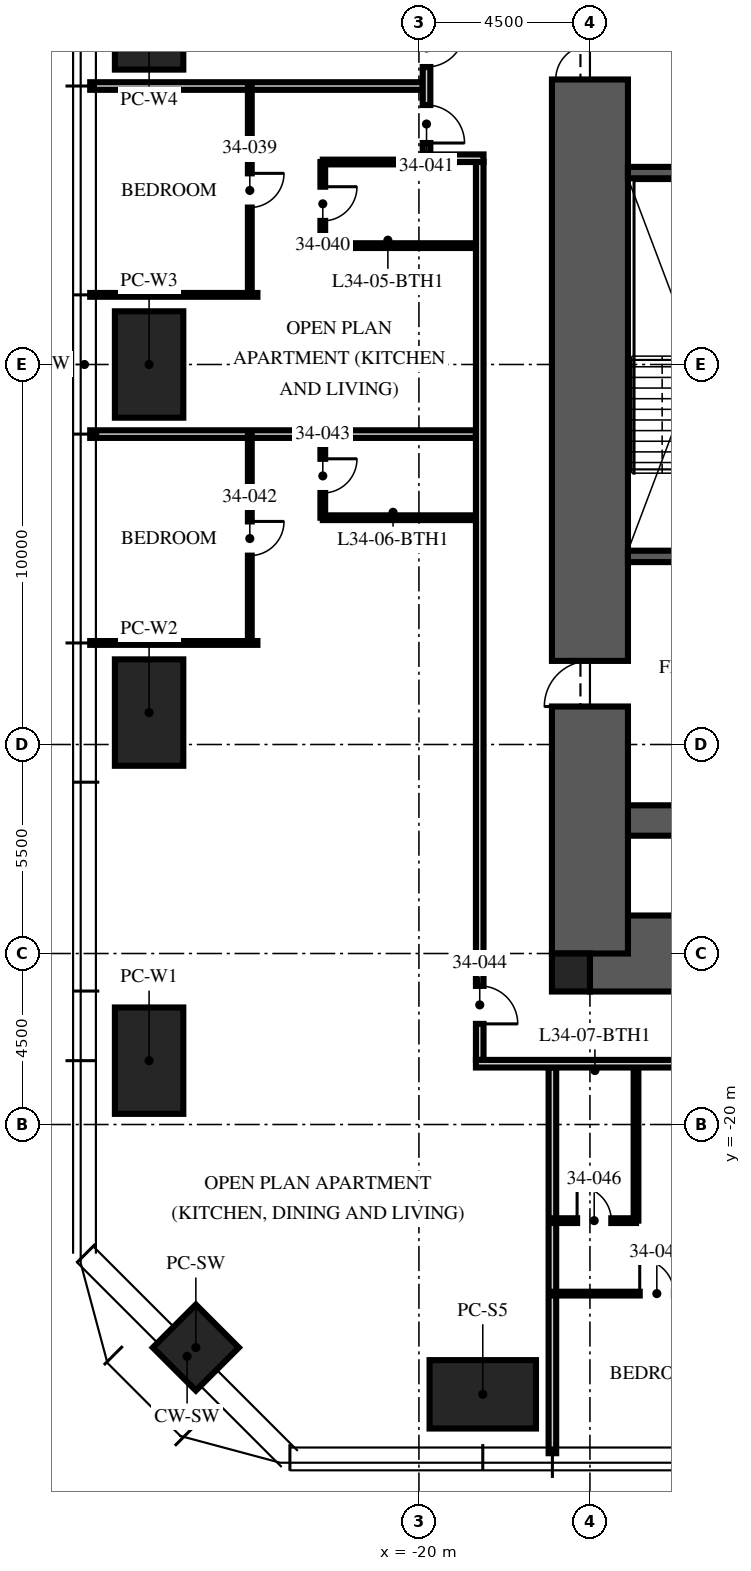
"""IFC4 building model, lengths in metres.
Left out: names, types, materials, properties, quantities, classifications, styles, units other than length and angle.
Written with IfcOpenShell. Run it as: python <this file> out.ifc"""

import sys

from ifc_helpers import new_model, si_unit, direction, frame, frame_2d, origin, origin_2d, place, context, subcontext, project, spatial, rectangle, extrude, element, fill, save


model = new_model("IFC4")
c1 = context("Model", 3, precision=1e-05, world=origin(), true_north=direction((0.0, 1.0)))
c2 = subcontext(c1, "Body", "Model", "MODEL_VIEW")
j1 = project(units=[si_unit("LENGTHUNIT", "METRE"), si_unit("PLANEANGLEUNIT", "RADIAN")], contexts=[c1])
p1 = place(None, origin())
s1 = spatial("IfcSite", under=j1, at=p1, CompositionType="ELEMENT")
p2 = place(p1, origin())
s2 = spatial("IfcBuilding", under=s1, at=p2, CompositionType="ELEMENT")
p3 = place(p2, frame((0.0, 0.0, 137.25)))
s3 = spatial("IfcBuildingStorey", under=s2, at=p3, CompositionType="ELEMENT", Elevation=137.25)
p4 = place(p3, frame((-15.5, -15.5, -0.25), z_axis=(0.0, 0.0, 1.0), x_axis=(1.0, 0.0, 0.0)))
e1 = element("IfcWall", 1, at=p4, inside=s3, PredefinedType="SHEAR", context=c2, shape_type="SweptSolid", body=[
    extrude(rectangle(XDim=31.0, YDim=2.0, at=frame_2d((15.5, 0.0))), origin(), (0.0, 0.0, 1.0), 3.75),
])
p5 = place(p4, frame((10.4, 0.0, 0.25)))
e2 = element("IfcOpeningElement", 2, at=p5, cuts=e1, PredefinedType="OPENING", context=c2, shape_type="SweptSolid", body=[
    extrude(rectangle(XDim=1.1, YDim=2.1, at=frame_2d((0.55, 1.05))), frame((0.0, 1.01, 0.0), z_axis=(0.0, -1.0, 0.0), x_axis=(1.0, 0.0, 0.0)), (0.0, 0.0, 1.0), 2.02),
])
p6 = place(p4, frame((13.5, 0.0, 0.25)))
e3 = element("IfcOpeningElement", 3, at=p6, cuts=e1, PredefinedType="OPENING", context=c2, shape_type="SweptSolid", body=[
    extrude(rectangle(XDim=1.1, YDim=2.1, at=frame_2d((0.55, 1.05))), frame((0.0, 1.01, 0.0), z_axis=(0.0, -1.0, 0.0), x_axis=(1.0, 0.0, 0.0)), (0.0, 0.0, 1.0), 2.02),
])
p7 = place(p4, frame((16.6, 0.0, 0.25)))
e4 = element("IfcOpeningElement", 4, at=p7, cuts=e1, PredefinedType="OPENING", context=c2, shape_type="SweptSolid", body=[
    extrude(rectangle(XDim=1.1, YDim=2.1, at=frame_2d((0.55, 1.05))), frame((0.0, 1.01, 0.0), z_axis=(0.0, -1.0, 0.0), x_axis=(1.0, 0.0, 0.0)), (0.0, 0.0, 1.0), 2.02),
])
p8 = place(p3, frame((-15.5, -12.0, -0.25), z_axis=(0.0, 0.0, 1.0), x_axis=(1.0, 0.0, 0.0)))
e5 = element("IfcWall", 5, at=p8, inside=s3, PredefinedType="SHEAR", context=c2, shape_type="SweptSolid", body=[
    extrude(rectangle(XDim=31.0, YDim=0.8, at=frame_2d((15.5, 0.0))), origin(), (0.0, 0.0, 1.0), 3.75),
])
p9 = place(p3, frame((-15.5, -15.5, -0.25), z_axis=(0.0, 0.0, 1.0), x_axis=(0.0, 1.0, 0.0)))
e6 = element("IfcWall", 6, at=p9, inside=s3, PredefinedType="SHEAR", context=c2, shape_type="SweptSolid", body=[
    extrude(rectangle(XDim=31.0, YDim=2.0, at=frame_2d((15.5, 0.0))), origin(), (0.0, 0.0, 1.0), 3.75),
])
p10 = place(p9, frame((6.5, 0.0, 0.25)))
e7 = element("IfcOpeningElement", 7, at=p10, cuts=e6, PredefinedType="OPENING", context=c2, shape_type="SweptSolid", body=[
    extrude(rectangle(XDim=1.2, YDim=2.1, at=frame_2d((0.6, 1.05))), frame((0.0, 1.01, 0.0), z_axis=(0.0, -1.0, 0.0), x_axis=(1.0, 0.0, 0.0)), (0.0, 0.0, 1.0), 2.02),
])
p11 = place(p9, frame((23.0, 0.0, 0.25)))
e8 = element("IfcOpeningElement", 8, at=p11, cuts=e6, PredefinedType="OPENING", context=c2, shape_type="SweptSolid", body=[
    extrude(rectangle(XDim=1.8, YDim=2.1, at=frame_2d((0.9, 1.05))), frame((0.0, 1.01, 0.0), z_axis=(0.0, -1.0, 0.0), x_axis=(1.0, 0.0, 0.0)), (0.0, 0.0, 1.0), 2.02),
])
p12 = place(p3, frame((-16.0, -16.0, -0.25), z_axis=(0.0, 0.0, 1.0), x_axis=(1.0, 0.0, 0.0)))
e9 = element("IfcColumn", 9, at=p12, inside=s3, PredefinedType="COLUMN", context=c2, shape_type="SweptSolid", body=[
    extrude(rectangle(XDim=1.0, YDim=1.0, at=origin_2d()), origin(), (0.0, 0.0, 1.0), 3.75),
])
for number, where, z_axis, x_axis in (
    (10, (-18.32, -27.1, 0.0), (0.0, 0.0, 1.0), (1.0, 0.0, 0.0)),
    (11, (-27.1, -18.32, 0.0), (0.0, 0.0, 1.0), (0.0, 1.0, 0.0)),
    (12, (-27.1, -9.16, 0.0), (0.0, 0.0, 1.0), (0.0, 1.0, 0.0)),
    (13, (-27.1, 0.0, 0.0), (0.0, 0.0, 1.0), (0.0, 1.0, 0.0)),
    (14, (-27.1, 9.16, 0.0), (0.0, 0.0, 1.0), (0.0, 1.0, 0.0)),
):
    element("IfcColumn", number, at=place(p3, frame(where, z_axis=z_axis, x_axis=x_axis)), inside=s3, PredefinedType="COLUMN", context=c2, shape_type="SweptSolid", body=[
        extrude(rectangle(XDim=2.8, YDim=1.8, at=origin_2d()), origin(), (0.0, 0.0, 1.0), 3.75),
    ])
p13 = place(p3, frame((-25.87, -25.87, 0.0), z_axis=(0.0, 0.0, 1.0), x_axis=(0.707106781187, -0.707106781187, 0.0)))
e15 = element("IfcColumn", 15, at=p13, inside=s3, PredefinedType="COLUMN", context=c2, shape_type="SweptSolid", body=[
    extrude(rectangle(XDim=1.6, YDim=1.6, at=origin_2d()), origin(), (0.0, 0.0, 1.0), 3.75),
])
p14 = place(p3, frame((-14.5, -5.05, 0.0), z_axis=(0.0, 0.0, 1.0), x_axis=(1.0, 0.0, 0.0)))
e16 = element("IfcWall", 16, at=p14, inside=s3, PredefinedType="SOLIDWALL", context=c2, shape_type="SweptSolid", body=[
    extrude(rectangle(XDim=5.7, YDim=0.3, at=frame_2d((2.85, 0.0))), origin(), (0.0, 0.0, 1.0), 3.5),
])
p15 = place(p14, frame((1.25, 0.0, 0.0)))
e17 = element("IfcOpeningElement", 17, at=p15, cuts=e16, PredefinedType="OPENING", context=c2, shape_type="SweptSolid", body=[
    extrude(rectangle(XDim=1.2, YDim=2.1, at=frame_2d((0.6, 1.05))), frame((0.0, 0.16, 0.0), z_axis=(0.0, -1.0, 0.0), x_axis=(1.0, 0.0, 0.0)), (0.0, 0.0, 1.0), 0.32),
])
p16 = place(p3, frame((-14.5, 5.05, 0.0), z_axis=(0.0, 0.0, 1.0), x_axis=(1.0, 0.0, 0.0)))
e18 = element("IfcWall", 18, at=p16, inside=s3, PredefinedType="SOLIDWALL", context=c2, shape_type="SweptSolid", body=[
    extrude(rectangle(XDim=3.7, YDim=0.3, at=frame_2d((1.85, 0.0))), origin(), (0.0, 0.0, 1.0), 3.5),
])
p17 = place(p3, frame((-19.9, 7.328, 0.0), z_axis=(0.0, 0.0, 1.0), x_axis=(-1.0, 0.0, 0.0)))
e19 = element("IfcWall", 19, at=p17, inside=s3, PredefinedType="PARTITIONING", context=c2, shape_type="SweptSolid", body=[
    extrude(rectangle(XDim=8.75, YDim=0.2, at=frame_2d((4.375, 0.0))), origin(), (0.0, 0.0, 1.0), 2.81),
])
p18 = place(p3, frame((-24.25, 1.832, 0.0), z_axis=(0.0, 0.0, 1.0), x_axis=(-1.0, 0.0, 0.0)))
e20 = element("IfcWall", 20, at=p18, inside=s3, PredefinedType="PARTITIONING", context=c2, shape_type="SweptSolid", body=[
    extrude(rectangle(XDim=4.4, YDim=0.1, at=frame_2d((2.2, 0.0))), origin(), (0.0, 0.0, 1.0), 2.81),
])
p19 = place(p3, frame((-18.5, -1.832, 0.0), z_axis=(0.0, 0.0, 1.0), x_axis=(-1.0, 0.0, 0.0)))
e21 = element("IfcWall", 21, at=p19, inside=s3, PredefinedType="PARTITIONING", context=c2, shape_type="SweptSolid", body=[
    extrude(rectangle(XDim=10.15, YDim=0.2, at=frame_2d((5.075, 0.0))), origin(), (0.0, 0.0, 1.0), 2.81),
])
p20 = place(p3, frame((-24.25, -7.328, 0.0), z_axis=(0.0, 0.0, 1.0), x_axis=(-1.0, 0.0, 0.0)))
e22 = element("IfcWall", 22, at=p20, inside=s3, PredefinedType="PARTITIONING", context=c2, shape_type="SweptSolid", body=[
    extrude(rectangle(XDim=4.4, YDim=0.1, at=frame_2d((2.2, 0.0))), origin(), (0.0, 0.0, 1.0), 2.81),
])
p21 = place(p3, frame((-16.488, -18.5, 0.0), z_axis=(0.0, 0.0, 1.0), x_axis=(0.0, -1.0, 0.0)))
e23 = element("IfcWall", 23, at=p21, inside=s3, PredefinedType="PARTITIONING", context=c2, shape_type="SweptSolid", body=[
    extrude(rectangle(XDim=10.15, YDim=0.2, at=frame_2d((5.075, 0.0))), origin(), (0.0, 0.0, 1.0), 2.81),
])
p22 = place(p3, frame((-24.45, 7.328, 0.0), z_axis=(0.0, 0.0, 1.0), x_axis=(0.0, -1.0, 0.0)))
e24 = element("IfcWall", 24, at=p22, inside=s3, PredefinedType="PARTITIONING", context=c2, shape_type="SweptSolid", body=[
    extrude(rectangle(XDim=5.496, YDim=0.1, at=frame_2d((2.748, 0.0))), origin(), (0.0, 0.0, 1.0), 2.81),
])
p23 = place(p22, frame((2.298, 0.0, 0.0)))
e25 = element("IfcOpeningElement", 25, at=p23, cuts=e24, PredefinedType="OPENING", context=c2, shape_type="SweptSolid", body=[
    extrude(rectangle(XDim=0.9, YDim=2.1, at=frame_2d((0.45, 1.05))), frame((0.0, 0.06, 0.0), z_axis=(0.0, -1.0, 0.0), x_axis=(1.0, 0.0, 0.0)), (0.0, 0.0, 1.0), 0.12),
])
p24 = place(p3, frame((-22.53, 5.328, 0.0), z_axis=(0.0, 0.0, 1.0), x_axis=(0.0, -1.0, 0.0)))
e26 = element("IfcWall", 26, at=p24, inside=s3, PredefinedType="PARTITIONING", context=c2, shape_type="SweptSolid", body=[
    extrude(rectangle(XDim=2.2, YDim=0.125, at=frame_2d((1.1, 0.0))), origin(), (0.0, 0.0, 1.0), 2.81),
])
p25 = place(p24, frame((0.65, 0.0, 0.0)))
e27 = element("IfcOpeningElement", 27, at=p25, cuts=e26, PredefinedType="OPENING", context=c2, shape_type="SweptSolid", body=[
    extrude(rectangle(XDim=0.9, YDim=2.1, at=frame_2d((0.45, 1.05))), frame((0.0, 0.073, 0.0), z_axis=(0.0, -1.0, 0.0), x_axis=(1.0, 0.0, 0.0)), (0.0, 0.0, 1.0), 0.145),
])
p26 = place(p3, frame((-19.97, 5.328, 0.0), z_axis=(0.0, 0.0, 1.0), x_axis=(-1.0, 0.0, 0.0)))
e28 = element("IfcWall", 28, at=p26, inside=s3, PredefinedType="PARTITIONING", context=c2, shape_type="SweptSolid", body=[
    extrude(rectangle(XDim=2.56, YDim=0.125, at=frame_2d((1.28, 0.0))), origin(), (0.0, 0.0, 1.0), 3.5),
])
p27 = place(p3, frame((-18.5, 3.128, 0.0), z_axis=(0.0, 0.0, 1.0), x_axis=(-1.0, 0.0, 0.0)))
e29 = element("IfcWall", 29, at=p27, inside=s3, PredefinedType="PARTITIONING", context=c2, shape_type="SweptSolid", body=[
    extrude(rectangle(XDim=4.03, YDim=0.125, at=frame_2d((2.015, 0.0))), origin(), (0.0, 0.0, 1.0), 3.5),
])
p28 = place(p3, frame((-24.45, -1.832, 0.0), z_axis=(0.0, 0.0, 1.0), x_axis=(0.0, -1.0, 0.0)))
e30 = element("IfcWall", 30, at=p28, inside=s3, PredefinedType="PARTITIONING", context=c2, shape_type="SweptSolid", body=[
    extrude(rectangle(XDim=5.496, YDim=0.1, at=frame_2d((2.748, 0.0))), origin(), (0.0, 0.0, 1.0), 2.81),
])
p29 = place(p28, frame((2.298, 0.0, 0.0)))
e31 = element("IfcOpeningElement", 31, at=p29, cuts=e30, PredefinedType="OPENING", context=c2, shape_type="SweptSolid", body=[
    extrude(rectangle(XDim=0.9, YDim=2.1, at=frame_2d((0.45, 1.05))), frame((0.0, 0.06, 0.0), z_axis=(0.0, -1.0, 0.0), x_axis=(1.0, 0.0, 0.0)), (0.0, 0.0, 1.0), 0.12),
])
p30 = place(p3, frame((-22.53, -1.832, 0.0), z_axis=(0.0, 0.0, 1.0), x_axis=(0.0, -1.0, 0.0)))
e32 = element("IfcWall", 32, at=p30, inside=s3, PredefinedType="PARTITIONING", context=c2, shape_type="SweptSolid", body=[
    extrude(rectangle(XDim=2.2, YDim=0.125, at=frame_2d((1.1, 0.0))), origin(), (0.0, 0.0, 1.0), 3.5),
])
p31 = place(p30, frame((0.65, 0.0, 0.0)))
e33 = element("IfcOpeningElement", 33, at=p31, cuts=e32, PredefinedType="OPENING", context=c2, shape_type="SweptSolid", body=[
    extrude(rectangle(XDim=0.9, YDim=2.1, at=frame_2d((0.45, 1.05))), frame((0.0, 0.073, 0.0), z_axis=(0.0, -1.0, 0.0), x_axis=(1.0, 0.0, 0.0)), (0.0, 0.0, 1.0), 0.145),
])
p32 = place(p3, frame((-18.5, -4.032, 0.0), z_axis=(0.0, 0.0, 1.0), x_axis=(-1.0, 0.0, 0.0)))
e34 = element("IfcWall", 34, at=p32, inside=s3, PredefinedType="PARTITIONING", context=c2, shape_type="SweptSolid", body=[
    extrude(rectangle(XDim=4.03, YDim=0.125, at=frame_2d((2.015, 0.0))), origin(), (0.0, 0.0, 1.0), 3.5),
])
p33 = place(p3, frame((-16.488, -24.45, 0.0), z_axis=(0.0, 0.0, 1.0), x_axis=(1.0, 0.0, 0.0)))
e35 = element("IfcWall", 35, at=p33, inside=s3, PredefinedType="PARTITIONING", context=c2, shape_type="SweptSolid", body=[
    extrude(rectangle(XDim=5.496, YDim=0.1, at=frame_2d((2.748, 0.0))), origin(), (0.0, 0.0, 1.0), 2.81),
])
p34 = place(p33, frame((2.298, 0.0, 0.0)))
e36 = element("IfcOpeningElement", 36, at=p34, cuts=e35, PredefinedType="OPENING", context=c2, shape_type="SweptSolid", body=[
    extrude(rectangle(XDim=0.9, YDim=2.1, at=frame_2d((0.45, 1.05))), frame((0.0, 0.06, 0.0), z_axis=(0.0, -1.0, 0.0), x_axis=(1.0, 0.0, 0.0)), (0.0, 0.0, 1.0), 0.12),
])
p35 = place(p3, frame((-16.488, -22.53, 0.0), z_axis=(0.0, 0.0, 1.0), x_axis=(1.0, 0.0, 0.0)))
e37 = element("IfcWall", 37, at=p35, inside=s3, PredefinedType="PARTITIONING", context=c2, shape_type="SweptSolid", body=[
    extrude(rectangle(XDim=2.2, YDim=0.125, at=frame_2d((1.1, 0.0))), origin(), (0.0, 0.0, 1.0), 3.5),
])
p36 = place(p35, frame((0.65, 0.0, 0.0)))
e38 = element("IfcOpeningElement", 38, at=p36, cuts=e37, PredefinedType="OPENING", context=c2, shape_type="SweptSolid", body=[
    extrude(rectangle(XDim=0.9, YDim=2.1, at=frame_2d((0.45, 1.05))), frame((0.0, 0.073, 0.0), z_axis=(0.0, -1.0, 0.0), x_axis=(1.0, 0.0, 0.0)), (0.0, 0.0, 1.0), 0.145),
])
p37 = place(p3, frame((-14.288, -18.5, 0.0), z_axis=(0.0, 0.0, 1.0), x_axis=(0.0, -1.0, 0.0)))
e39 = element("IfcWall", 39, at=p37, inside=s3, PredefinedType="PARTITIONING", context=c2, shape_type="SweptSolid", body=[
    extrude(rectangle(XDim=4.03, YDim=0.125, at=frame_2d((2.015, 0.0))), origin(), (0.0, 0.0, 1.0), 3.5),
])
p38 = place(p3, frame((-18.3, 5.428, 0.0), z_axis=(0.0, 0.0, 1.0), x_axis=(-1.0, 0.0, 0.0)))
e40 = element("IfcWall", 40, at=p38, inside=s3, PredefinedType="PARTITIONING", context=c2, shape_type="SweptSolid", body=[
    extrude(rectangle(XDim=1.6, YDim=0.2, at=frame_2d((0.8, 0.0))), origin(), (0.0, 0.0, 1.0), 3.5),
])
p39 = place(p3, frame((-19.8, 9.128, 0.0), z_axis=(0.0, 0.0, 1.0), x_axis=(0.0, -1.0, 0.0)))
e41 = element("IfcWall", 41, at=p39, inside=s3, PredefinedType="PARTITIONING", context=c2, shape_type="SweptSolid", body=[
    extrude(rectangle(XDim=3.6, YDim=0.2, at=frame_2d((1.8, 0.0))), origin(), (0.0, 0.0, 1.0), 2.7),
])
p40 = place(p39, frame((0.3, 0.0, 0.0)))
e42 = element("IfcOpeningElement", 42, at=p40, cuts=e41, PredefinedType="OPENING", context=c2, shape_type="SweptSolid", body=[
    extrude(rectangle(XDim=1.0, YDim=2.2, at=frame_2d((0.5, 1.1))), frame((0.0, 0.11, 0.0), z_axis=(0.0, -1.0, 0.0), x_axis=(1.0, 0.0, 0.0)), (0.0, 0.0, 1.0), 0.22),
])
p41 = place(p39, frame((2.3, 0.0, 0.0)))
e43 = element("IfcOpeningElement", 43, at=p41, cuts=e41, PredefinedType="OPENING", context=c2, shape_type="SweptSolid", body=[
    extrude(rectangle(XDim=1.0, YDim=2.2, at=frame_2d((0.5, 1.1))), frame((0.0, 0.11, 0.0), z_axis=(0.0, -1.0, 0.0), x_axis=(1.0, 0.0, 0.0)), (0.0, 0.0, 1.0), 0.22),
])
p42 = place(p3, frame((-18.4, 5.328, 0.0), z_axis=(0.0, 0.0, 1.0), x_axis=(0.0, -1.0, 0.0)))
e44 = element("IfcWall", 44, at=p42, inside=s3, PredefinedType="PARTITIONING", context=c2, shape_type="SweptSolid", body=[
    extrude(rectangle(XDim=23.628, YDim=0.2, at=frame_2d((11.814, 0.0))), origin(), (0.0, 0.0, 1.0), 2.3),
])
p43 = place(p42, frame((21.68, 0.0, 0.0)))
e45 = element("IfcOpeningElement", 45, at=p43, cuts=e44, PredefinedType="OPENING", context=c2, shape_type="SweptSolid", body=[
    extrude(rectangle(XDim=1.0, YDim=2.2, at=frame_2d((0.5, 1.1))), frame((0.0, 0.11, 0.0), z_axis=(0.0, -1.0, 0.0), x_axis=(1.0, 0.0, 0.0)), (0.0, 0.0, 1.0), 0.22),
])
p44 = place(p3, frame((-8.6, -18.4, 0.0), z_axis=(0.0, 0.0, 1.0), x_axis=(-1.0, 0.0, 0.0)))
e46 = element("IfcWall", 46, at=p44, inside=s3, PredefinedType="PARTITIONING", context=c2, shape_type="SweptSolid", body=[
    extrude(rectangle(XDim=9.9, YDim=0.2, at=frame_2d((4.95, 0.0))), origin(), (0.0, 0.0, 1.0), 2.3),
])
p45 = place(p44, frame((0.868, 0.0, 0.0)))
e47 = element("IfcOpeningElement", 47, at=p45, cuts=e46, PredefinedType="OPENING", context=c2, shape_type="SweptSolid", body=[
    extrude(rectangle(XDim=1.0, YDim=2.2, at=frame_2d((0.5, 1.1))), frame((0.0, 0.11, 0.0), z_axis=(0.0, -1.0, 0.0), x_axis=(1.0, 0.0, 0.0)), (0.0, 0.0, 1.0), 0.22),
])
p46 = place(p10, origin())
e48 = element("IfcDoor", 48, at=p46, inside=s3, OperationType="SINGLE_SWING_LEFT", PredefinedType="DOOR", context=c2, shape_type="SweptSolid", body=[
    extrude(rectangle(XDim=1.2, YDim=2.1, at=frame_2d((0.6, 1.05))), frame((0.0, 0.025, 0.0), z_axis=(0.0, -1.0, 0.0), x_axis=(1.0, 0.0, 0.0)), (0.0, 0.0, 1.0), 0.05),
])
fill(e7, e48)
p47 = place(p11, origin())
e49 = element("IfcDoor", 49, at=p47, inside=s3, OperationType="DOUBLE_DOOR_SINGLE_SWING", PredefinedType="DOOR", context=c2, shape_type="SweptSolid", body=[
    extrude(rectangle(XDim=1.8, YDim=2.1, at=frame_2d((0.9, 1.05))), frame((0.0, 0.025, 0.0), z_axis=(0.0, -1.0, 0.0), x_axis=(1.0, 0.0, 0.0)), (0.0, 0.0, 1.0), 0.05),
])
fill(e8, e49)
p48 = place(p40, origin())
e50 = element("IfcDoor", 50, at=p48, inside=s3, OperationType="SINGLE_SWING_LEFT", PredefinedType="DOOR", context=c2, shape_type="SweptSolid", body=[
    extrude(rectangle(XDim=1.0, YDim=2.2, at=frame_2d((0.5, 1.1))), frame((0.0, 0.025, 0.0), z_axis=(0.0, -1.0, 0.0), x_axis=(1.0, 0.0, 0.0)), (0.0, 0.0, 1.0), 0.05),
])
fill(e42, e50)
p49 = place(p23, origin())
e51 = element("IfcDoor", 51, at=p49, inside=s3, OperationType="SINGLE_SWING_LEFT", PredefinedType="DOOR", context=c2, shape_type="SweptSolid", body=[
    extrude(rectangle(XDim=0.9, YDim=2.1, at=frame_2d((0.45, 1.05))), frame((0.0, 0.025, 0.0), z_axis=(0.0, -1.0, 0.0), x_axis=(1.0, 0.0, 0.0)), (0.0, 0.0, 1.0), 0.05),
])
fill(e25, e51)
p50 = place(p25, origin())
e52 = element("IfcDoor", 52, at=p50, inside=s3, OperationType="SINGLE_SWING_LEFT", PredefinedType="DOOR", context=c2, shape_type="SweptSolid", body=[
    extrude(rectangle(XDim=0.9, YDim=2.1, at=frame_2d((0.45, 1.05))), frame((0.0, 0.025, 0.0), z_axis=(0.0, -1.0, 0.0), x_axis=(1.0, 0.0, 0.0)), (0.0, 0.0, 1.0), 0.05),
])
fill(e27, e52)
p51 = place(p41, origin())
e53 = element("IfcDoor", 53, at=p51, inside=s3, OperationType="SINGLE_SWING_RIGHT", PredefinedType="DOOR", context=c2, shape_type="SweptSolid", body=[
    extrude(rectangle(XDim=1.0, YDim=2.2, at=frame_2d((0.5, 1.1))), frame((0.0, 0.025, 0.0), z_axis=(0.0, -1.0, 0.0), x_axis=(1.0, 0.0, 0.0)), (0.0, 0.0, 1.0), 0.05),
])
fill(e43, e53)
p52 = place(p29, origin())
e54 = element("IfcDoor", 54, at=p52, inside=s3, OperationType="SINGLE_SWING_LEFT", PredefinedType="DOOR", context=c2, shape_type="SweptSolid", body=[
    extrude(rectangle(XDim=0.9, YDim=2.1, at=frame_2d((0.45, 1.05))), frame((0.0, 0.025, 0.0), z_axis=(0.0, -1.0, 0.0), x_axis=(1.0, 0.0, 0.0)), (0.0, 0.0, 1.0), 0.05),
])
fill(e31, e54)
p53 = place(p31, origin())
e55 = element("IfcDoor", 55, at=p53, inside=s3, OperationType="SINGLE_SWING_LEFT", PredefinedType="DOOR", context=c2, shape_type="SweptSolid", body=[
    extrude(rectangle(XDim=0.9, YDim=2.1, at=frame_2d((0.45, 1.05))), frame((0.0, 0.025, 0.0), z_axis=(0.0, -1.0, 0.0), x_axis=(1.0, 0.0, 0.0)), (0.0, 0.0, 1.0), 0.05),
])
fill(e33, e55)
p54 = place(p43, origin())
e56 = element("IfcDoor", 56, at=p54, inside=s3, OperationType="SINGLE_SWING_RIGHT", PredefinedType="DOOR", context=c2, shape_type="SweptSolid", body=[
    extrude(rectangle(XDim=1.0, YDim=2.2, at=frame_2d((0.5, 1.1))), frame((0.0, 0.025, 0.0), z_axis=(0.0, -1.0, 0.0), x_axis=(1.0, 0.0, 0.0)), (0.0, 0.0, 1.0), 0.05),
])
fill(e45, e56)
p55 = place(p34, origin())
e57 = element("IfcDoor", 57, at=p55, inside=s3, OperationType="SINGLE_SWING_LEFT", PredefinedType="DOOR", context=c2, shape_type="SweptSolid", body=[
    extrude(rectangle(XDim=0.9, YDim=2.1, at=frame_2d((0.45, 1.05))), frame((0.0, 0.025, 0.0), z_axis=(0.0, -1.0, 0.0), x_axis=(1.0, 0.0, 0.0)), (0.0, 0.0, 1.0), 0.05),
])
fill(e36, e57)
p56 = place(p36, origin())
e58 = element("IfcDoor", 58, at=p56, inside=s3, OperationType="SINGLE_SWING_LEFT", PredefinedType="DOOR", context=c2, shape_type="SweptSolid", body=[
    extrude(rectangle(XDim=0.9, YDim=2.1, at=frame_2d((0.45, 1.05))), frame((0.0, 0.025, 0.0), z_axis=(0.0, -1.0, 0.0), x_axis=(1.0, 0.0, 0.0)), (0.0, 0.0, 1.0), 0.05),
])
fill(e38, e58)
save(model, sys.argv[1])
